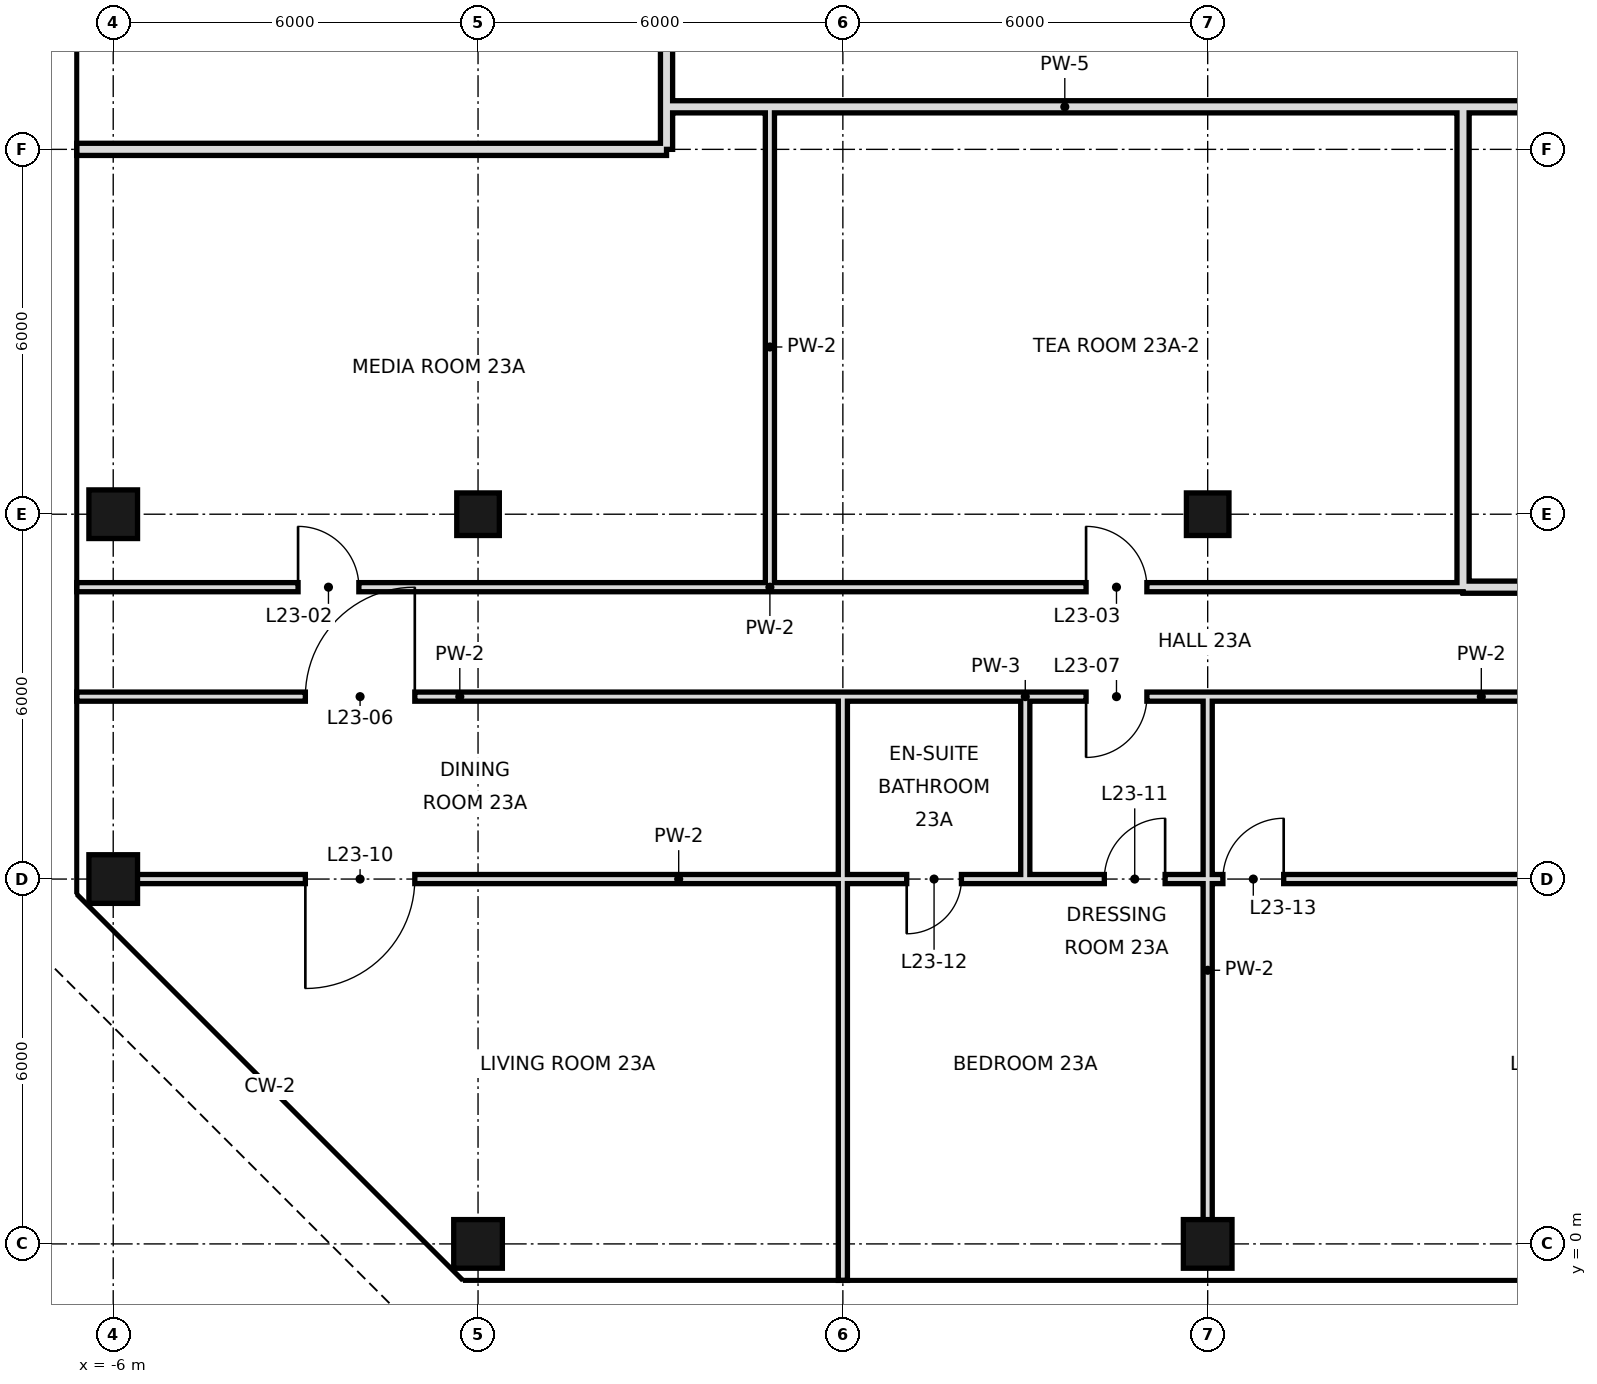
"""IFC4 building model, lengths in metres.
Left out: names, types, materials, properties, quantities, classifications, styles, units other than length and angle.
Written with IfcOpenShell. Run it as: python <this file> out.ifc"""

import sys

from ifc_helpers import new_model, si_unit, direction, frame, frame_2d, origin, origin_2d, place, context, subcontext, project, spatial, rectangle, hollow_rectangle, extrude, element, fill, save


model = new_model("IFC4")
c1 = context("Model", 3, precision=1e-05, world=origin(), true_north=direction((0.0, 1.0)))
c2 = subcontext(c1, "Body", "Model", "MODEL_VIEW")
j1 = project(units=[si_unit("LENGTHUNIT", "METRE"), si_unit("PLANEANGLEUNIT", "RADIAN")], contexts=[c1])
p1 = place(None, origin())
s1 = spatial("IfcSite", under=j1, at=p1, CompositionType="ELEMENT")
p2 = place(p1, origin())
s2 = spatial("IfcBuilding", under=s1, at=p2, CompositionType="ELEMENT")
p3 = place(p2, frame((0.0, 0.0, 107.0)))
s3 = spatial("IfcBuildingStorey", under=s2, at=p3, CompositionType="ELEMENT", Elevation=107.0)
for number, where, z_axis, x_axis in (
    (1, (-6.0, 6.0, 0.0), (0.0, 0.0, 1.0), (1.0, 0.0, 0.0)),
    (2, (-6.0, 12.0, 0.0), (0.0, 0.0, 1.0), (1.0, 0.0, 0.0)),
    (3, (0.0, 0.0, 0.0), (0.0, 0.0, 1.0), (1.0, 0.0, 0.0)),
):
    element("IfcColumn", number, at=place(p3, frame(where, z_axis=z_axis, x_axis=x_axis)), inside=s3, PredefinedType="COLUMN", context=c2, shape_type="SweptSolid", body=[
        extrude(hollow_rectangle(XDim=0.8, YDim=0.8, WallThickness=0.04, at=origin_2d()), origin(), (0.0, 0.0, 1.0), 3.6),
    ])
p4 = place(p3, frame((0.0, 12.0, 0.0), z_axis=(0.0, 0.0, 1.0), x_axis=(1.0, 0.0, 0.0)))
e4 = element("IfcColumn", 4, at=p4, inside=s3, PredefinedType="COLUMN", context=c2, shape_type="SweptSolid", body=[
    extrude(hollow_rectangle(XDim=0.7, YDim=0.7, WallThickness=0.036, at=origin_2d()), origin(), (0.0, 0.0, 1.0), 3.6),
])
p5 = place(p3, frame((12.0, 0.0, 0.0), z_axis=(0.0, 0.0, 1.0), x_axis=(1.0, 0.0, 0.0)))
e5 = element("IfcColumn", 5, at=p5, inside=s3, PredefinedType="COLUMN", context=c2, shape_type="SweptSolid", body=[
    extrude(hollow_rectangle(XDim=0.8, YDim=0.8, WallThickness=0.04, at=origin_2d()), origin(), (0.0, 0.0, 1.0), 3.6),
])
p6 = place(p3, frame((12.0, 12.0, 0.0), z_axis=(0.0, 0.0, 1.0), x_axis=(1.0, 0.0, 0.0)))
e6 = element("IfcColumn", 6, at=p6, inside=s3, PredefinedType="COLUMN", context=c2, shape_type="SweptSolid", body=[
    extrude(hollow_rectangle(XDim=0.7, YDim=0.7, WallThickness=0.036, at=origin_2d()), origin(), (0.0, 0.0, 1.0), 3.6),
])
p7 = place(p3, frame((12.0, 0.0, 0.0), z_axis=(0.0, 0.0, 1.0), x_axis=(0.0, 1.0, 0.0)))
e7 = element("IfcWall", 7, at=p7, inside=s3, PredefinedType="PARTITIONING", context=c2, shape_type="SweptSolid", body=[
    extrude(rectangle(XDim=9.0, YDim=0.15, at=frame_2d((4.5, 0.0))), origin(), (0.0, 0.0, 1.0), 2.72),
])
p8 = place(p3, frame((16.2, 10.8, 0.0), z_axis=(0.0, 0.0, 1.0), x_axis=(0.0, 1.0, 0.0)))
e8 = element("IfcWall", 8, at=p8, inside=s3, PredefinedType="SOLIDWALL", context=c2, shape_type="SweptSolid", body=[
    extrude(rectangle(XDim=7.9, YDim=0.2, at=frame_2d((3.95, 0.0))), origin(), (0.0, 0.0, 1.0), 2.72),
])
p9 = place(p3, frame((3.1, 18.0, 0.0), z_axis=(0.0, 0.0, 1.0), x_axis=(0.0, 1.0, 0.0)))
e9 = element("IfcWall", 9, at=p9, inside=s3, PredefinedType="SOLIDWALL", context=c2, shape_type="SweptSolid", body=[
    extrude(rectangle(XDim=30.6, YDim=0.2, at=frame_2d((15.3, 0.0))), origin(), (0.0, 0.0, 1.0), 2.72),
])
p10 = place(p9, frame((9.23, 0.0, 0.0)))
e10 = element("IfcOpeningElement", 10, at=p10, cuts=e9, PredefinedType="OPENING", context=c2, shape_type="SweptSolid", body=[
    extrude(rectangle(XDim=1.2, YDim=2.4, at=frame_2d((0.6, 1.2))), frame((0.0, 0.11, 0.0), z_axis=(0.0, -1.0, 0.0), x_axis=(1.0, 0.0, 0.0)), (0.0, 0.0, 1.0), 0.22),
])
p11 = place(p3, frame((4.8, 10.8, 0.0), z_axis=(0.0, 0.0, 1.0), x_axis=(0.0, 1.0, 0.0)))
e11 = element("IfcWall", 11, at=p11, inside=s3, PredefinedType="PARTITIONING", context=c2, shape_type="SweptSolid", body=[
    extrude(rectangle(XDim=7.9, YDim=0.15, at=frame_2d((3.95, 0.0))), origin(), (0.0, 0.0, 1.0), 3.42),
])
p12 = place(p3, frame((6.0, -0.6, 0.0), z_axis=(0.0, 0.0, 1.0), x_axis=(0.0, 1.0, 0.0)))
e12 = element("IfcWall", 12, at=p12, inside=s3, PredefinedType="PARTITIONING", context=c2, shape_type="SweptSolid", body=[
    extrude(rectangle(XDim=6.6, YDim=0.15, at=frame_2d((3.3, 0.0))), origin(), (0.0, 0.0, 1.0), 2.72),
])
p13 = place(p3, frame((6.0, 6.0, 0.0), z_axis=(0.0, 0.0, 1.0), x_axis=(0.0, 1.0, 0.0)))
e13 = element("IfcWall", 13, at=p13, inside=s3, PredefinedType="PARTITIONING", context=c2, shape_type="SweptSolid", body=[
    extrude(rectangle(XDim=3.0, YDim=0.15, at=frame_2d((1.5, 0.0))), origin(), (0.0, 0.0, 1.0), 2.72),
])
p14 = place(p3, frame((9.0, 6.0, 0.0), z_axis=(0.0, 0.0, 1.0), x_axis=(0.0, 1.0, 0.0)))
e14 = element("IfcWall", 14, at=p14, inside=s3, PredefinedType="PARTITIONING", context=c2, shape_type="SweptSolid", body=[
    extrude(rectangle(XDim=3.0, YDim=0.15, at=frame_2d((1.5, 0.0))), origin(), (0.0, 0.0, 1.0), 3.42),
])
p15 = place(p3, frame((16.2, 10.8, 0.0), z_axis=(0.0, 0.0, 1.0), x_axis=(1.0, 0.0, 0.0)))
e15 = element("IfcWall", 15, at=p15, inside=s3, PredefinedType="SOLIDWALL", context=c2, shape_type="SweptSolid", body=[
    extrude(rectangle(XDim=5.4, YDim=0.2, at=frame_2d((2.7, 0.0))), origin(), (0.0, 0.0, 1.0), 2.72),
])
p16 = place(p15, frame((2.98, 0.0, 0.0)))
e16 = element("IfcOpeningElement", 16, at=p16, cuts=e15, PredefinedType="OPENING", context=c2, shape_type="SweptSolid", body=[
    extrude(rectangle(XDim=1.0, YDim=2.4, at=frame_2d((0.5, 1.2))), frame((0.0, 0.11, 0.0), z_axis=(0.0, -1.0, 0.0), x_axis=(1.0, 0.0, 0.0)), (0.0, 0.0, 1.0), 0.22),
])
p17 = place(p3, frame((-6.6, 10.8, 0.0), z_axis=(0.0, 0.0, 1.0), x_axis=(1.0, 0.0, 0.0)))
e17 = element("IfcWall", 17, at=p17, inside=s3, PredefinedType="PARTITIONING", context=c2, shape_type="SweptSolid", body=[
    extrude(rectangle(XDim=22.8, YDim=0.15, at=frame_2d((11.4, 0.0))), origin(), (0.0, 0.0, 1.0), 3.42),
])
p18 = place(p17, frame((3.64, 0.0, 0.0)))
e18 = element("IfcOpeningElement", 18, at=p18, cuts=e17, PredefinedType="OPENING", context=c2, shape_type="SweptSolid", body=[
    extrude(rectangle(XDim=1.0, YDim=2.4, at=frame_2d((0.5, 1.2))), frame((0.0, 0.085, 0.0), z_axis=(0.0, -1.0, 0.0), x_axis=(1.0, 0.0, 0.0)), (0.0, 0.0, 1.0), 0.17),
])
p19 = place(p17, frame((16.6, 0.0, 0.0)))
e19 = element("IfcOpeningElement", 19, at=p19, cuts=e17, PredefinedType="OPENING", context=c2, shape_type="SweptSolid", body=[
    extrude(rectangle(XDim=1.0, YDim=2.4, at=frame_2d((0.5, 1.2))), frame((0.0, 0.085, 0.0), z_axis=(0.0, -1.0, 0.0), x_axis=(1.0, 0.0, 0.0)), (0.0, 0.0, 1.0), 0.17),
])
p20 = place(p3, frame((-6.6, 18.0, 0.0), z_axis=(0.0, 0.0, 1.0), x_axis=(1.0, 0.0, 0.0)))
e20 = element("IfcWall", 20, at=p20, inside=s3, PredefinedType="SOLIDWALL", context=c2, shape_type="SweptSolid", body=[
    extrude(rectangle(XDim=9.7, YDim=0.2, at=frame_2d((4.85, 0.0))), origin(), (0.0, 0.0, 1.0), 2.72),
])
p21 = place(p3, frame((3.1, 18.7, 0.0), z_axis=(0.0, 0.0, 1.0), x_axis=(1.0, 0.0, 0.0)))
e21 = element("IfcWall", 21, at=p21, inside=s3, PredefinedType="SOLIDWALL", context=c2, shape_type="SweptSolid", body=[
    extrude(rectangle(XDim=13.1, YDim=0.2, at=frame_2d((6.55, 0.0))), origin(), (0.0, 0.0, 1.0), 2.72),
])
p22 = place(p3, frame((16.2, 18.7, 0.0), z_axis=(0.0, 0.0, 1.0), x_axis=(1.0, 0.0, 0.0)))
e22 = element("IfcWall", 22, at=p22, inside=s3, PredefinedType="SOLIDWALL", context=c2, shape_type="SweptSolid", body=[
    extrude(rectangle(XDim=5.4, YDim=0.2, at=frame_2d((2.7, 0.0))), origin(), (0.0, 0.0, 1.0), 2.72),
])
p23 = place(p3, frame((-6.0, 6.0, 0.0), z_axis=(0.0, 0.0, 1.0), x_axis=(1.0, 0.0, 0.0)))
e23 = element("IfcWall", 23, at=p23, inside=s3, PredefinedType="PARTITIONING", context=c2, shape_type="SweptSolid", body=[
    extrude(rectangle(XDim=12.0, YDim=0.15, at=frame_2d((6.0, 0.0))), origin(), (0.0, 0.0, 1.0), 2.97),
])
p24 = place(p23, frame((3.16, 0.0, 0.0)))
e24 = element("IfcOpeningElement", 24, at=p24, cuts=e23, PredefinedType="OPENING", context=c2, shape_type="SweptSolid", body=[
    extrude(rectangle(XDim=1.8, YDim=2.4, at=frame_2d((0.9, 1.2))), frame((0.0, 0.085, 0.0), z_axis=(0.0, -1.0, 0.0), x_axis=(1.0, 0.0, 0.0)), (0.0, 0.0, 1.0), 0.17),
])
p25 = place(p3, frame((9.0, 6.0, 0.0), z_axis=(0.0, 0.0, 1.0), x_axis=(1.0, 0.0, 0.0)))
e25 = element("IfcWall", 25, at=p25, inside=s3, PredefinedType="PARTITIONING", context=c2, shape_type="SweptSolid", body=[
    extrude(rectangle(XDim=15.0, YDim=0.15, at=frame_2d((7.5, 0.0))), origin(), (0.0, 0.0, 1.0), 2.97),
])
p26 = place(p25, frame((1.3, 0.0, 0.0)))
e26 = element("IfcOpeningElement", 26, at=p26, cuts=e25, PredefinedType="OPENING", context=c2, shape_type="SweptSolid", body=[
    extrude(rectangle(XDim=1.0, YDim=2.4, at=frame_2d((0.5, 1.2))), frame((0.0, 0.085, 0.0), z_axis=(0.0, -1.0, 0.0), x_axis=(1.0, 0.0, 0.0)), (0.0, 0.0, 1.0), 0.17),
])
p27 = place(p25, frame((3.25, 0.0, 0.0)))
e27 = element("IfcOpeningElement", 27, at=p27, cuts=e25, PredefinedType="OPENING", context=c2, shape_type="SweptSolid", body=[
    extrude(rectangle(XDim=1.0, YDim=2.4, at=frame_2d((0.5, 1.2))), frame((0.0, 0.085, 0.0), z_axis=(0.0, -1.0, 0.0), x_axis=(1.0, 0.0, 0.0)), (0.0, 0.0, 1.0), 0.17),
])
p28 = place(p3, frame((6.0, 6.0, 0.0), z_axis=(0.0, 0.0, 1.0), x_axis=(1.0, 0.0, 0.0)))
e28 = element("IfcWall", 28, at=p28, inside=s3, PredefinedType="PARTITIONING", context=c2, shape_type="SweptSolid", body=[
    extrude(rectangle(XDim=3.0, YDim=0.15, at=frame_2d((1.5, 0.0))), origin(), (0.0, 0.0, 1.0), 2.97),
])
p29 = place(p28, frame((1.05, 0.0, 0.0)))
e29 = element("IfcOpeningElement", 29, at=p29, cuts=e28, PredefinedType="OPENING", context=c2, shape_type="SweptSolid", body=[
    extrude(rectangle(XDim=0.9, YDim=2.4, at=frame_2d((0.45, 1.2))), frame((0.0, 0.085, 0.0), z_axis=(0.0, -1.0, 0.0), x_axis=(1.0, 0.0, 0.0)), (0.0, 0.0, 1.0), 0.17),
])
p30 = place(p3, frame((-6.6, 9.0, 0.0), z_axis=(0.0, 0.0, 1.0), x_axis=(1.0, 0.0, 0.0)))
e30 = element("IfcWall", 30, at=p30, inside=s3, PredefinedType="PARTITIONING", context=c2, shape_type="SweptSolid", body=[
    extrude(rectangle(XDim=12.6, YDim=0.15, at=frame_2d((6.3, 0.0))), origin(), (0.0, 0.0, 1.0), 3.42),
])
p31 = place(p30, frame((3.76, 0.0, 0.0)))
e31 = element("IfcOpeningElement", 31, at=p31, cuts=e30, PredefinedType="OPENING", context=c2, shape_type="SweptSolid", body=[
    extrude(rectangle(XDim=1.8, YDim=2.4, at=frame_2d((0.9, 1.2))), frame((0.0, 0.085, 0.0), z_axis=(0.0, -1.0, 0.0), x_axis=(1.0, 0.0, 0.0)), (0.0, 0.0, 1.0), 0.17),
])
p32 = place(p3, frame((9.0, 9.0, 0.0), z_axis=(0.0, 0.0, 1.0), x_axis=(1.0, 0.0, 0.0)))
e32 = element("IfcWall", 32, at=p32, inside=s3, PredefinedType="PARTITIONING", context=c2, shape_type="SweptSolid", body=[
    extrude(rectangle(XDim=15.0, YDim=0.15, at=frame_2d((7.5, 0.0))), origin(), (0.0, 0.0, 1.0), 3.42),
])
p33 = place(p32, frame((1.0, 0.0, 0.0)))
e33 = element("IfcOpeningElement", 33, at=p33, cuts=e32, PredefinedType="OPENING", context=c2, shape_type="SweptSolid", body=[
    extrude(rectangle(XDim=1.0, YDim=2.4, at=frame_2d((0.5, 1.2))), frame((0.0, 0.085, 0.0), z_axis=(0.0, -1.0, 0.0), x_axis=(1.0, 0.0, 0.0)), (0.0, 0.0, 1.0), 0.17),
])
p34 = place(p32, frame((10.6, 0.0, 0.0)))
e34 = element("IfcOpeningElement", 34, at=p34, cuts=e32, PredefinedType="OPENING", context=c2, shape_type="SweptSolid", body=[
    extrude(rectangle(XDim=1.0, YDim=2.4, at=frame_2d((0.5, 1.2))), frame((0.0, 0.085, 0.0), z_axis=(0.0, -1.0, 0.0), x_axis=(1.0, 0.0, 0.0)), (0.0, 0.0, 1.0), 0.17),
])
p35 = place(p3, frame((6.0, 9.0, 0.0), z_axis=(0.0, 0.0, 1.0), x_axis=(1.0, 0.0, 0.0)))
e35 = element("IfcWall", 35, at=p35, inside=s3, PredefinedType="PARTITIONING", context=c2, shape_type="SweptSolid", body=[
    extrude(rectangle(XDim=3.0, YDim=0.15, at=frame_2d((1.5, 0.0))), origin(), (0.0, 0.0, 1.0), 3.42),
])
p36 = place(p18, origin())
e36 = element("IfcDoor", 36, at=p36, inside=s3, OperationType="SINGLE_SWING_LEFT", PredefinedType="DOOR", context=c2, shape_type="SweptSolid", body=[
    extrude(rectangle(XDim=1.0, YDim=2.4, at=frame_2d((0.5, 1.2))), frame((0.0, 0.025, 0.0), z_axis=(0.0, -1.0, 0.0), x_axis=(1.0, 0.0, 0.0)), (0.0, 0.0, 1.0), 0.05),
])
fill(e18, e36)
p37 = place(p19, origin())
e37 = element("IfcDoor", 37, at=p37, inside=s3, OperationType="SINGLE_SWING_LEFT", PredefinedType="DOOR", context=c2, shape_type="SweptSolid", body=[
    extrude(rectangle(XDim=1.0, YDim=2.4, at=frame_2d((0.5, 1.2))), frame((0.0, 0.025, 0.0), z_axis=(0.0, -1.0, 0.0), x_axis=(1.0, 0.0, 0.0)), (0.0, 0.0, 1.0), 0.05),
])
fill(e19, e37)
p38 = place(p31, frame((1.8, 0.0, 0.0), z_axis=(0.0, 0.0, 1.0), x_axis=(-1.0, 0.0, 0.0)))
e38 = element("IfcDoor", 38, at=p38, inside=s3, OperationType="SINGLE_SWING_LEFT", PredefinedType="DOOR", context=c2, shape_type="SweptSolid", body=[
    extrude(rectangle(XDim=1.8, YDim=2.4, at=frame_2d((0.9, 1.2))), frame((0.0, 0.025, 0.0), z_axis=(0.0, -1.0, 0.0), x_axis=(1.0, 0.0, 0.0)), (0.0, 0.0, 1.0), 0.05),
])
fill(e31, e38)
p39 = place(p33, frame((1.0, 0.0, 0.0), z_axis=(0.0, 0.0, 1.0), x_axis=(-1.0, 0.0, 0.0)))
e39 = element("IfcDoor", 39, at=p39, inside=s3, OperationType="SINGLE_SWING_RIGHT", PredefinedType="DOOR", context=c2, shape_type="SweptSolid", body=[
    extrude(rectangle(XDim=1.0, YDim=2.4, at=frame_2d((0.5, 1.2))), frame((0.0, 0.025, 0.0), z_axis=(0.0, -1.0, 0.0), x_axis=(1.0, 0.0, 0.0)), (0.0, 0.0, 1.0), 0.05),
])
fill(e33, e39)
p40 = place(p24, frame((1.8, 0.0, 0.0), z_axis=(0.0, 0.0, 1.0), x_axis=(-1.0, 0.0, 0.0)))
e40 = element("IfcDoor", 40, at=p40, inside=s3, OperationType="SINGLE_SWING_RIGHT", PredefinedType="DOOR", context=c2, shape_type="SweptSolid", body=[
    extrude(rectangle(XDim=1.8, YDim=2.4, at=frame_2d((0.9, 1.2))), frame((0.0, 0.025, 0.0), z_axis=(0.0, -1.0, 0.0), x_axis=(1.0, 0.0, 0.0)), (0.0, 0.0, 1.0), 0.05),
])
fill(e24, e40)
p41 = place(p26, frame((1.0, 0.0, 0.0), z_axis=(0.0, 0.0, 1.0), x_axis=(-1.0, 0.0, 0.0)))
e41 = element("IfcDoor", 41, at=p41, inside=s3, OperationType="SINGLE_SWING_LEFT", PredefinedType="DOOR", context=c2, shape_type="SweptSolid", body=[
    extrude(rectangle(XDim=1.0, YDim=2.4, at=frame_2d((0.5, 1.2))), frame((0.0, 0.025, 0.0), z_axis=(0.0, -1.0, 0.0), x_axis=(1.0, 0.0, 0.0)), (0.0, 0.0, 1.0), 0.05),
])
fill(e26, e41)
p42 = place(p29, frame((0.9, 0.0, 0.0), z_axis=(0.0, 0.0, 1.0), x_axis=(-1.0, 0.0, 0.0)))
e42 = element("IfcDoor", 42, at=p42, inside=s3, OperationType="SINGLE_SWING_RIGHT", PredefinedType="DOOR", context=c2, shape_type="SweptSolid", body=[
    extrude(rectangle(XDim=0.9, YDim=2.4, at=frame_2d((0.45, 1.2))), frame((0.0, 0.025, 0.0), z_axis=(0.0, -1.0, 0.0), x_axis=(1.0, 0.0, 0.0)), (0.0, 0.0, 1.0), 0.05),
])
fill(e29, e42)
p43 = place(p27, frame((1.0, 0.0, 0.0), z_axis=(0.0, 0.0, 1.0), x_axis=(-1.0, 0.0, 0.0)))
e43 = element("IfcDoor", 43, at=p43, inside=s3, OperationType="SINGLE_SWING_LEFT", PredefinedType="DOOR", context=c2, shape_type="SweptSolid", body=[
    extrude(rectangle(XDim=1.0, YDim=2.4, at=frame_2d((0.5, 1.2))), frame((0.0, 0.025, 0.0), z_axis=(0.0, -1.0, 0.0), x_axis=(1.0, 0.0, 0.0)), (0.0, 0.0, 1.0), 0.05),
])
fill(e27, e43)
save(model, sys.argv[1])
